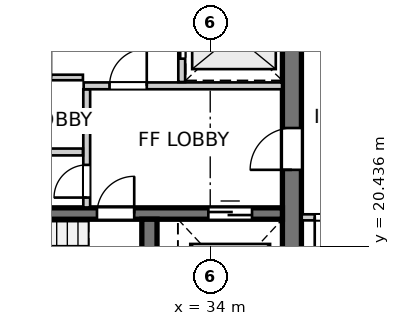
"""IFC4 building model, lengths in metres.
Left out: names, types, materials, properties, quantities, classifications, styles, units other than length and angle.
Written with IfcOpenShell. Run it as: python <this file> out.ifc"""

import sys

from ifc_helpers import new_model, si_unit, direction, frame, frame_2d, origin, place, context, subcontext, project, spatial, rectangle, extrude, source, transform, mapped, element, fill, save


model = new_model("IFC4")
c1 = context("Model", 3, precision=1e-05, world=origin(), true_north=direction((0.0, 1.0)))
c2 = subcontext(c1, "Body", "Model", "MODEL_VIEW")
j1 = project(units=[si_unit("LENGTHUNIT", "METRE"), si_unit("PLANEANGLEUNIT", "RADIAN")], contexts=[c1])
p1 = place(None, origin())
s1 = spatial("IfcSite", under=j1, at=p1, CompositionType="ELEMENT")
p2 = place(p1, origin())
s2 = spatial("IfcBuilding", under=s1, at=p2, CompositionType="ELEMENT")
p3 = place(p2, frame((0.0, 0.0, 211.6)))
s3 = spatial("IfcBuildingStorey", under=s2, at=p3, CompositionType="ELEMENT", Elevation=211.6)
p4 = place(p3, frame((36.15, 18.2, 0.0), z_axis=(0.0, 0.0, 1.0), x_axis=(0.0, 1.0, 0.0)))
e1 = element("IfcWall", 1, at=p4, inside=s3, PredefinedType="SHEAR", context=c2, shape_type="SweptSolid", body=[
    extrude(rectangle(XDim=15.6, YDim=0.5, at=frame_2d((7.8, 0.0))), origin(), (0.0, 0.0, 1.0), 2.96),
])
p5 = place(p4, frame((4.25, 0.0, 0.0)))
e2 = element("IfcOpeningElement", 2, at=p5, cuts=e1, PredefinedType="OPENING", context=c2, shape_type="SweptSolid", body=[
    extrude(rectangle(XDim=1.1, YDim=2.15, at=frame_2d((0.55, 1.075))), frame((0.0, 0.26, 0.0), z_axis=(0.0, -1.0, 0.0), x_axis=(1.0, 0.0, 0.0)), (0.0, 0.0, 1.0), 0.52),
])
p6 = place(p4, frame((10.25, 0.0, 0.0)))
e3 = element("IfcOpeningElement", 3, at=p6, cuts=e1, PredefinedType="OPENING", context=c2, shape_type="SweptSolid", body=[
    extrude(rectangle(XDim=1.1, YDim=2.15, at=frame_2d((0.55, 1.075))), frame((0.0, 0.26, 0.0), z_axis=(0.0, -1.0, 0.0), x_axis=(1.0, 0.0, 0.0)), (0.0, 0.0, 1.0), 0.52),
])
p7 = place(p3, frame((24.8, 21.3, 0.0), z_axis=(0.0, 0.0, 1.0), x_axis=(1.0, 0.0, 0.0)))
e4 = element("IfcWall", 4, at=p7, inside=s3, PredefinedType="SHEAR", context=c2, shape_type="SweptSolid", body=[
    extrude(rectangle(XDim=11.1, YDim=0.3, at=frame_2d((5.55, 0.0))), origin(), (0.0, 0.0, 1.0), 2.96),
])
p8 = place(p7, frame((6.22, 0.0, 0.0)))
e5 = element("IfcOpeningElement", 5, at=p8, cuts=e4, PredefinedType="OPENING", context=c2, shape_type="SweptSolid", body=[
    extrude(rectangle(XDim=0.98, YDim=2.15, at=frame_2d((0.49, 1.075))), frame((0.0, 0.16, 0.0), z_axis=(0.0, -1.0, 0.0), x_axis=(1.0, 0.0, 0.0)), (0.0, 0.0, 1.0), 0.32),
])
p9 = place(p7, frame((9.15, 0.0, 0.0)))
e6 = element("IfcOpeningElement", 6, at=p9, cuts=e4, PredefinedType="OPENING", context=c2, shape_type="SweptSolid", body=[
    extrude(rectangle(XDim=1.15, YDim=2.15, at=frame_2d((0.575, 1.075))), frame((0.0, 0.16, 0.0), z_axis=(0.0, -1.0, 0.0), x_axis=(1.0, 0.0, 0.0)), (0.0, 0.0, 1.0), 0.32),
])
p10 = place(p3, frame((32.4, 18.2, 0.0), z_axis=(0.0, 0.0, 1.0), x_axis=(0.0, 1.0, 0.0)))
e7 = element("IfcWall", 7, at=p10, inside=s3, PredefinedType="SHEAR", context=c2, shape_type="SweptSolid", body=[
    extrude(rectangle(XDim=2.95, YDim=0.4, at=frame_2d((1.475, 0.0))), origin(), (0.0, 0.0, 1.0), 2.96),
])
p11 = place(p3, frame((30.75, 21.46, 0.0), z_axis=(0.0, 0.0, 1.0), x_axis=(0.0, 1.0, 0.0)))
e8 = element("IfcWall", 8, at=p11, inside=s3, PredefinedType="PARTITIONING", context=c2, shape_type="SweptSolid", body=[
    extrude(rectangle(XDim=3.11, YDim=0.18, at=frame_2d((1.555, 0.0))), origin(), (0.0, 0.0, 1.0), 2.96),
])
p12 = place(p11, frame((0.26, 0.0, 0.0)))
e9 = element("IfcOpeningElement", 9, at=p12, cuts=e8, PredefinedType="OPENING", context=c2, shape_type="SweptSolid", body=[
    extrude(rectangle(XDim=0.86, YDim=2.05, at=frame_2d((0.43, 1.025))), frame((0.0, 0.1, 0.0), z_axis=(0.0, -1.0, 0.0), x_axis=(1.0, 0.0, 0.0)), (0.0, 0.0, 1.0), 0.2),
])
p13 = place(p3, frame((30.67, 24.66, 0.0), z_axis=(0.0, 0.0, 1.0), x_axis=(1.0, 0.0, 0.0)))
e10 = element("IfcWall", 10, at=p13, inside=s3, PredefinedType="PARTITIONING", context=c2, shape_type="SweptSolid", body=[
    extrude(rectangle(XDim=5.22, YDim=0.18, at=frame_2d((2.61, 0.0))), origin(), (0.0, 0.0, 1.0), 2.96),
])
p14 = place(p13, frame((0.68, 0.0, 0.0)))
e11 = element("IfcOpeningElement", 11, at=p14, cuts=e10, PredefinedType="OPENING", context=c2, shape_type="SweptSolid", body=[
    extrude(rectangle(XDim=0.98, YDim=2.15, at=frame_2d((0.49, 1.075))), frame((0.0, 0.1, 0.0), z_axis=(0.0, -1.0, 0.0), x_axis=(1.0, 0.0, 0.0)), (0.0, 0.0, 1.0), 0.2),
])
p15 = place(p3, frame((33.25, 24.76, 0.0), z_axis=(0.0, 0.0, 1.0), x_axis=(0.0, 1.0, 0.0)))
e12 = element("IfcWall", 12, at=p15, inside=s3, PredefinedType="PARTITIONING", context=c2, shape_type="SweptSolid", body=[
    extrude(rectangle(XDim=2.48, YDim=0.18, at=frame_2d((1.24, 0.0))), origin(), (0.0, 0.0, 1.0), 2.96),
])
p16 = place(p15, frame((0.615, 0.0, 0.0)))
e13 = element("IfcOpeningElement", 13, at=p16, cuts=e12, PredefinedType="OPENING", context=c2, shape_type="SweptSolid", body=[
    extrude(rectangle(XDim=1.25, YDim=2.15, at=frame_2d((0.625, 1.075))), frame((0.0, 0.1, 0.0), z_axis=(0.0, -1.0, 0.0), x_axis=(1.0, 0.0, 0.0)), (0.0, 0.0, 1.0), 0.2),
])
p17 = place(p3, frame((24.81, 22.92, 0.0), z_axis=(0.0, 0.0, 1.0), x_axis=(1.0, 0.0, 0.0)))
e14 = element("IfcWall", 14, at=p17, inside=s3, PredefinedType="PARTITIONING", context=c2, shape_type="SweptSolid", body=[
    extrude(rectangle(XDim=5.84, YDim=0.18, at=frame_2d((2.92, 0.0))), origin(), (0.0, 0.0, 1.0), 2.96),
])
p18 = place(p3, frame((28.13, 24.88, 0.0), z_axis=(0.0, 0.0, 1.0), x_axis=(1.0, 0.0, 0.0)))
e15 = element("IfcWall", 15, at=p18, inside=s3, PredefinedType="PARTITIONING", context=c2, shape_type="SweptSolid", body=[
    extrude(rectangle(XDim=2.52, YDim=0.145, at=frame_2d((1.26, 0.0))), origin(), (0.0, 0.0, 1.0), 2.96),
])
p19 = place(p18, frame((0.82, 0.0, 0.0)))
e16 = element("IfcOpeningElement", 16, at=p19, cuts=e15, PredefinedType="OPENING", context=c2, shape_type="SweptSolid", body=[
    extrude(rectangle(XDim=0.86, YDim=2.05, at=frame_2d((0.43, 1.025))), frame((0.0, 0.083, 0.0), z_axis=(0.0, -1.0, 0.0), x_axis=(1.0, 0.0, 0.0)), (0.0, 0.0, 1.0), 0.165),
])
p20 = place(p3, frame((38.02, 21.2, 0.0), z_axis=(0.0, 0.0, 1.0), x_axis=(-1.0, 0.0, 0.0)))
e17 = element("IfcWall", 17, at=p20, inside=s3, PredefinedType="PARTITIONING", context=c2, shape_type="SweptSolid", body=[
    extrude(rectangle(XDim=1.612, YDim=0.16, at=frame_2d((0.806, 0.0))), origin(), (0.0, 0.0, 1.0), 2.96),
])
p21 = place(p20, frame((0.35, 0.0, 0.0)))
e18 = element("IfcOpeningElement", 18, at=p21, cuts=e17, PredefinedType="OPENING", context=c2, shape_type="SweptSolid", body=[
    extrude(rectangle(XDim=0.92, YDim=2.1, at=frame_2d((0.46, 1.05))), frame((0.0, 0.09, 0.0), z_axis=(0.0, -1.0, 0.0), x_axis=(1.0, 0.0, 0.0)), (0.0, 0.0, 1.0), 0.18),
])
m1 = source(origin(), c2, "Body", "SweptSolid", [
    extrude(rectangle(XDim=0.98, YDim=2.15, at=frame_2d((0.49, 1.075))), frame((0.0, 0.025, 0.0), z_axis=(0.0, -1.0, 0.0), x_axis=(1.0, 0.0, 0.0)), (0.0, 0.0, 1.0), 0.05),
])
p22 = place(p8, origin())
e19 = element("IfcDoor", 19, at=p22, inside=s3, OperationType="SINGLE_SWING_RIGHT", PredefinedType="DOOR", context=c2, shape_type="MappedRepresentation", body=[
    mapped(m1, transform((0.0, 0.0, 0.0), x_axis=(1.0, 0.0, 0.0), y_axis=(0.0, 1.0, 0.0), z_axis=(0.0, 0.0, 1.0), scale=1.0)),
])
fill(e5, e19)
m2 = source(origin(), c2, "Body", "SweptSolid", [
    extrude(rectangle(XDim=1.15, YDim=2.15, at=frame_2d((0.575, 1.075))), frame((0.0, 0.025, 0.0), z_axis=(0.0, -1.0, 0.0), x_axis=(1.0, 0.0, 0.0)), (0.0, 0.0, 1.0), 0.05),
])
p23 = place(p9, origin())
e20 = element("IfcDoor", 20, at=p23, inside=s3, OperationType="DOUBLE_DOOR_SLIDING", PredefinedType="DOOR", context=c2, shape_type="MappedRepresentation", body=[
    mapped(m2, transform((0.0, 0.0, 0.0), x_axis=(1.0, 0.0, 0.0), y_axis=(0.0, 1.0, 0.0), z_axis=(0.0, 0.0, 1.0), scale=1.0)),
])
fill(e6, e20)
m3 = source(origin(), c2, "Body", "SweptSolid", [
    extrude(rectangle(XDim=1.1, YDim=2.15, at=frame_2d((0.55, 1.075))), frame((0.0, 0.025, 0.0), z_axis=(0.0, -1.0, 0.0), x_axis=(1.0, 0.0, 0.0)), (0.0, 0.0, 1.0), 0.05),
])
p24 = place(p5, origin())
e21 = element("IfcDoor", 21, at=p24, inside=s3, OperationType="SINGLE_SWING_LEFT", PredefinedType="DOOR", context=c2, shape_type="MappedRepresentation", body=[
    mapped(m3, transform((0.0, 0.0, 0.0), x_axis=(1.0, 0.0, 0.0), y_axis=(0.0, 1.0, 0.0), z_axis=(0.0, 0.0, 1.0), scale=1.0)),
])
fill(e2, e21)
m4 = source(origin(), c2, "Body", "SweptSolid", [
    extrude(rectangle(XDim=0.86, YDim=2.05, at=frame_2d((0.43, 1.025))), frame((0.0, 0.025, 0.0), z_axis=(0.0, -1.0, 0.0), x_axis=(1.0, 0.0, 0.0)), (0.0, 0.0, 1.0), 0.05),
])
p25 = place(p12, origin())
e22 = element("IfcDoor", 22, at=p25, inside=s3, OperationType="SINGLE_SWING_LEFT", PredefinedType="DOOR", context=c2, shape_type="MappedRepresentation", body=[
    mapped(m4, transform((0.0, 0.0, 0.0), x_axis=(1.0, 0.0, 0.0), y_axis=(0.0, 1.0, 0.0), z_axis=(0.0, 0.0, 1.0), scale=1.0)),
])
fill(e9, e22)
p26 = place(p14, origin())
e23 = element("IfcDoor", 23, at=p26, inside=s3, OperationType="SINGLE_SWING_RIGHT", PredefinedType="DOOR", context=c2, shape_type="MappedRepresentation", body=[
    mapped(m1, transform((0.0, 0.0, 0.0), x_axis=(1.0, 0.0, 0.0), y_axis=(0.0, 1.0, 0.0), z_axis=(0.0, 0.0, 1.0), scale=1.0)),
])
fill(e11, e23)
m5 = source(origin(), c2, "Body", "SweptSolid", [
    extrude(rectangle(XDim=1.25, YDim=2.15, at=frame_2d((0.625, 1.075))), frame((0.0, 0.025, 0.0), z_axis=(0.0, -1.0, 0.0), x_axis=(1.0, 0.0, 0.0)), (0.0, 0.0, 1.0), 0.05),
])
p27 = place(p16, origin())
e24 = element("IfcDoor", 24, at=p27, inside=s3, OperationType="DOUBLE_DOOR_SLIDING", PredefinedType="DOOR", context=c2, shape_type="MappedRepresentation", body=[
    mapped(m5, transform((0.0, 0.0, 0.0), x_axis=(1.0, 0.0, 0.0), y_axis=(0.0, 1.0, 0.0), z_axis=(0.0, 0.0, 1.0), scale=1.0)),
])
fill(e13, e24)
m6 = source(origin(), c2, "Body", "SweptSolid", [
    extrude(rectangle(XDim=0.92, YDim=2.1, at=frame_2d((0.46, 1.05))), frame((0.0, 0.025, 0.0), z_axis=(0.0, -1.0, 0.0), x_axis=(1.0, 0.0, 0.0)), (0.0, 0.0, 1.0), 0.05),
])
p28 = place(p21, origin())
e25 = element("IfcDoor", 25, at=p28, inside=s3, OperationType="SINGLE_SWING_RIGHT", PredefinedType="DOOR", context=c2, shape_type="MappedRepresentation", body=[
    mapped(m6, transform((0.0, 0.0, 0.0), x_axis=(1.0, 0.0, 0.0), y_axis=(0.0, 1.0, 0.0), z_axis=(0.0, 0.0, 1.0), scale=1.0)),
])
fill(e18, e25)
save(model, sys.argv[1])
